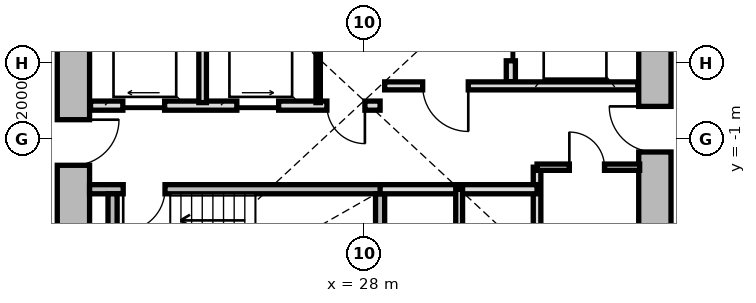
"""IFC4 building model, lengths in metres.
Left out: names, types, materials, properties, quantities, classifications, styles, units other than length and angle.
Written with IfcOpenShell. Run it as: python <this file> out.ifc"""

import sys

from ifc_helpers import new_model, si_unit, direction, frame, frame_2d, origin, place, context, subcontext, project, spatial, rectangle, extrude, source, transform, mapped, element, fill, save


model = new_model("IFC4")
c1 = context("Model", 3, precision=1e-05, world=origin(), true_north=direction((0.0, 1.0)))
c2 = subcontext(c1, "Body", "Model", "MODEL_VIEW")
j1 = project(units=[si_unit("LENGTHUNIT", "METRE"), si_unit("PLANEANGLEUNIT", "RADIAN")], contexts=[c1])
p1 = place(None, origin())
s1 = spatial("IfcSite", under=j1, at=p1, CompositionType="ELEMENT")
p2 = place(p1, origin())
s2 = spatial("IfcBuilding", under=s1, at=p2, CompositionType="ELEMENT")
p3 = place(p2, frame((0.0, 0.0, 21.6)))
s3 = spatial("IfcBuildingStorey", under=s2, at=p3, CompositionType="ELEMENT", Elevation=21.6)
m1 = source(origin(), c2, "Body", "SweptSolid", [
    extrude(rectangle(XDim=11.0, YDim=0.85, at=frame_2d((5.5, 0.0))), origin(), (0.0, 0.0, 1.0), 2.79),
])
p4 = place(p3, frame((20.35, -5.5, 0.0), z_axis=(0.0, 0.0, 1.0), x_axis=(0.0, 1.0, 0.0)))
e1 = element("IfcWall", 1, at=p4, inside=s3, PredefinedType="SHEAR", context=c2, shape_type="MappedRepresentation", body=[
    mapped(m1, transform((0.0, 0.0, 0.0), x_axis=(1.0, 0.0, 0.0), y_axis=(0.0, 1.0, 0.0), z_axis=(0.0, 0.0, 1.0), scale=1.0)),
])
p5 = place(p4, frame((3.8, 0.0, 0.0)))
e2 = element("IfcOpeningElement", 2, at=p5, cuts=e1, PredefinedType="OPENING", context=c2, shape_type="SweptSolid", body=[
    extrude(rectangle(XDim=1.2, YDim=2.15, at=frame_2d((0.6, 1.075))), frame((0.0, 0.435, 0.0), z_axis=(0.0, -1.0, 0.0), x_axis=(1.0, 0.0, 0.0)), (0.0, 0.0, 1.0), 0.87),
])
p6 = place(p3, frame((35.65, 5.5, 0.0), z_axis=(0.0, 0.0, 1.0), x_axis=(0.0, -1.0, 0.0)))
e3 = element("IfcWall", 3, at=p6, inside=s3, PredefinedType="SHEAR", context=c2, shape_type="MappedRepresentation", body=[
    mapped(m1, transform((0.0, 0.0, 0.0), x_axis=(1.0, 0.0, 0.0), y_axis=(0.0, 1.0, 0.0), z_axis=(0.0, 0.0, 1.0), scale=1.0)),
])
p7 = place(p6, frame((5.65, 0.0, 0.0)))
e4 = element("IfcOpeningElement", 4, at=p7, cuts=e3, PredefinedType="OPENING", context=c2, shape_type="SweptSolid", body=[
    extrude(rectangle(XDim=1.2, YDim=2.15, at=frame_2d((0.6, 1.075))), frame((0.0, 0.435, 0.0), z_axis=(0.0, -1.0, 0.0), x_axis=(1.0, 0.0, 0.0)), (0.0, 0.0, 1.0), 0.87),
])
p8 = place(p6, frame((9.3, 0.0, 0.0)))
e5 = element("IfcOpeningElement", 5, at=p8, cuts=e3, PredefinedType="OPENING", context=c2, shape_type="SweptSolid", body=[
    extrude(rectangle(XDim=1.0, YDim=2.1, at=frame_2d((0.5, 1.05))), frame((0.0, 0.435, 0.0), z_axis=(0.0, -1.0, 0.0), x_axis=(1.0, 0.0, 0.0)), (0.0, 0.0, 1.0), 0.87),
])
m2 = source(origin(), c2, "Body", "SweptSolid", [
    extrude(rectangle(XDim=7.765, YDim=0.24, at=frame_2d((3.883, 0.0))), origin(), (0.0, 0.0, 1.0), 2.79),
])
p9 = place(p3, frame((20.775, -2.33, 0.0), z_axis=(0.0, 0.0, 1.0), x_axis=(1.0, 0.0, 0.0)))
e6 = element("IfcWall", 6, at=p9, inside=s3, PredefinedType="PARTITIONING", context=c2, shape_type="MappedRepresentation", body=[
    mapped(m2, transform((0.0, 0.0, 0.0), x_axis=(1.0, 0.0, 0.0), y_axis=(0.0, 1.0, 0.0), z_axis=(0.0, 0.0, 1.0), scale=1.0)),
])
p10 = place(p9, frame((0.885, 0.0, 0.0)))
e7 = element("IfcOpeningElement", 7, at=p10, cuts=e6, PredefinedType="OPENING", context=c2, shape_type="SweptSolid", body=[
    extrude(rectangle(XDim=1.1, YDim=2.15, at=frame_2d((0.55, 1.075))), frame((0.0, 0.13, 0.0), z_axis=(0.0, -1.0, 0.0), x_axis=(1.0, 0.0, 0.0)), (0.0, 0.0, 1.0), 0.26),
])
m3 = source(origin(), c2, "Body", "SweptSolid", [
    extrude(rectangle(XDim=3.075, YDim=0.24, at=frame_2d((1.538, 0.0))), origin(), (0.0, 0.0, 1.0), 2.79),
])
for number, where, z_axis, x_axis in (
    (8, (21.38, -5.525, 0.0), (0.0, 0.0, 1.0), (0.0, 1.0, 0.0)),
    (9, (28.42, -5.525, 0.0), (0.0, 0.0, 1.0), (0.0, 1.0, 0.0)),
):
    element("IfcWall", number, at=place(p3, frame(where, z_axis=z_axis, x_axis=x_axis)), inside=s3, PredefinedType="PARTITIONING", context=c2, shape_type="MappedRepresentation", body=[
        mapped(m3, transform((0.0, 0.0, 0.0), x_axis=(1.0, 0.0, 0.0), y_axis=(0.0, 1.0, 0.0), z_axis=(0.0, 0.0, 1.0), scale=1.0)),
    ])
m4 = source(origin(), c2, "Body", "SweptSolid", [
    extrude(rectangle(XDim=5.0, YDim=0.24, at=frame_2d((2.5, 0.0))), origin(), (0.0, 0.0, 1.0), 2.775),
])
p11 = place(p3, frame((31.86, 0.5, 0.0), z_axis=(0.0, 0.0, 1.0), x_axis=(0.0, 1.0, 0.0)))
e10 = element("IfcWall", 10, at=p11, inside=s3, PredefinedType="PARTITIONING", context=c2, shape_type="MappedRepresentation", body=[
    mapped(m4, transform((0.0, 0.0, 0.0), x_axis=(1.0, 0.0, 0.0), y_axis=(0.0, 1.0, 0.0), z_axis=(0.0, 0.0, 1.0), scale=1.0)),
])
p12 = place(p11, frame((3.05, 0.0, 0.0)))
e11 = element("IfcOpeningElement", 11, at=p12, cuts=e10, PredefinedType="OPENING", context=c2, shape_type="SweptSolid", body=[
    extrude(rectangle(XDim=1.3, YDim=2.2, at=frame_2d((0.65, 1.1))), frame((0.0, 0.13, 0.0), z_axis=(0.0, -1.0, 0.0), x_axis=(1.0, 0.0, 0.0)), (0.0, 0.0, 1.0), 0.26),
])
p13 = place(p11, frame((0.55, 0.0, 0.0)))
e12 = element("IfcOpeningElement", 12, at=p13, cuts=e10, PredefinedType="OPENING", context=c2, shape_type="SweptSolid", body=[
    extrude(rectangle(XDim=1.3, YDim=2.2, at=frame_2d((0.65, 1.1))), frame((0.0, 0.13, 0.0), z_axis=(0.0, -1.0, 0.0), x_axis=(1.0, 0.0, 0.0)), (0.0, 0.0, 1.0), 0.26),
])
m5 = source(origin(), c2, "Body", "SweptSolid", [
    extrude(rectangle(XDim=6.66, YDim=0.21, at=frame_2d((3.33, 0.0))), origin(), (0.0, 0.0, 1.0), 2.775),
])
p14 = place(p3, frame((28.54, 0.39, 0.0), z_axis=(0.0, 0.0, 1.0), x_axis=(1.0, 0.0, 0.0)))
e13 = element("IfcWall", 13, at=p14, inside=s3, PredefinedType="PARTITIONING", context=c2, shape_type="MappedRepresentation", body=[
    mapped(m5, transform((0.0, 0.0, 0.0), x_axis=(1.0, 0.0, 0.0), y_axis=(0.0, 1.0, 0.0), z_axis=(0.0, 0.0, 1.0), scale=1.0)),
])
p15 = place(p14, frame((1.0, 0.0, 0.0)))
e14 = element("IfcOpeningElement", 14, at=p15, cuts=e13, PredefinedType="OPENING", context=c2, shape_type="SweptSolid", body=[
    extrude(rectangle(XDim=1.2, YDim=2.15, at=frame_2d((0.6, 1.075))), frame((0.0, 0.115, 0.0), z_axis=(0.0, -1.0, 0.0), x_axis=(1.0, 0.0, 0.0)), (0.0, 0.0, 1.0), 0.23),
])
m6 = source(origin(), c2, "Body", "SweptSolid", [
    extrude(rectangle(XDim=7.62, YDim=0.24, at=frame_2d((3.81, 0.0))), origin(), (0.0, 0.0, 1.0), 2.775),
])
p16 = place(p3, frame((20.8, -0.13, 0.0), z_axis=(0.0, 0.0, 1.0), x_axis=(1.0, 0.0, 0.0)))
e15 = element("IfcWall", 15, at=p16, inside=s3, PredefinedType="PARTITIONING", context=c2, shape_type="MappedRepresentation", body=[
    mapped(m6, transform((0.0, 0.0, 0.0), x_axis=(1.0, 0.0, 0.0), y_axis=(0.0, 1.0, 0.0), z_axis=(0.0, 0.0, 1.0), scale=1.0)),
])
p17 = place(p16, frame((6.22, 0.0, 0.0)))
e16 = element("IfcOpeningElement", 16, at=p17, cuts=e15, PredefinedType="OPENING", context=c2, shape_type="SweptSolid", body=[
    extrude(rectangle(XDim=1.0, YDim=2.1, at=frame_2d((0.5, 1.05))), frame((0.0, 0.13, 0.0), z_axis=(0.0, -1.0, 0.0), x_axis=(1.0, 0.0, 0.0)), (0.0, 0.0, 1.0), 0.26),
])
p18 = place(p16, frame((0.85, 0.0, 0.0)))
e17 = element("IfcOpeningElement", 17, at=p18, cuts=e15, PredefinedType="OPENING", context=c2, shape_type="SweptSolid", body=[
    extrude(rectangle(XDim=1.1, YDim=2.2, at=frame_2d((0.55, 1.1))), frame((0.0, 0.13, 0.0), z_axis=(0.0, -1.0, 0.0), x_axis=(1.0, 0.0, 0.0)), (0.0, 0.0, 1.0), 0.26),
])
p19 = place(p16, frame((3.85, 0.0, 0.0)))
e18 = element("IfcOpeningElement", 18, at=p19, cuts=e15, PredefinedType="OPENING", context=c2, shape_type="SweptSolid", body=[
    extrude(rectangle(XDim=1.1, YDim=2.2, at=frame_2d((0.55, 1.1))), frame((0.0, 0.13, 0.0), z_axis=(0.0, -1.0, 0.0), x_axis=(1.0, 0.0, 0.0)), (0.0, 0.0, 1.0), 0.26),
])
m7 = source(origin(), c2, "Body", "SweptSolid", [
    extrude(rectangle(XDim=2.33, YDim=0.115, at=frame_2d((1.165, 0.0))), origin(), (0.0, 0.0, 1.0), 2.775),
])
p20 = place(p3, frame((26.79, -0.05, 0.0), z_axis=(0.0, 0.0, 1.0), x_axis=(0.0, 1.0, 0.0)))
e19 = element("IfcWall", 19, at=p20, inside=s3, PredefinedType="PARTITIONING", context=c2, shape_type="MappedRepresentation", body=[
    mapped(m7, transform((0.0, 0.0, 0.0), x_axis=(1.0, 0.0, 0.0), y_axis=(0.0, 1.0, 0.0), z_axis=(0.0, 0.0, 1.0), scale=1.0)),
])
m8 = source(origin(), c2, "Body", "SweptSolid", [
    extrude(rectangle(XDim=2.33, YDim=0.2, at=frame_2d((1.165, 0.0))), origin(), (0.0, 0.0, 1.0), 2.775),
])
p21 = place(p3, frame((23.75, -0.05, 0.0), z_axis=(0.0, 0.0, 1.0), x_axis=(0.0, 1.0, 0.0)))
e20 = element("IfcWall", 20, at=p21, inside=s3, PredefinedType="PARTITIONING", context=c2, shape_type="MappedRepresentation", body=[
    mapped(m8, transform((0.0, 0.0, 0.0), x_axis=(1.0, 0.0, 0.0), y_axis=(0.0, 1.0, 0.0), z_axis=(0.0, 0.0, 1.0), scale=1.0)),
])
m9 = source(origin(), c2, "Body", "SweptSolid", [
    extrude(rectangle(XDim=3.8, YDim=0.2, at=frame_2d((1.9, 0.0))), origin(), (0.0, 0.0, 1.0), 2.775),
])
p22 = place(p3, frame((32.55, -5.55, 0.0), z_axis=(0.0, 0.0, 1.0), x_axis=(0.0, 1.0, 0.0)))
e21 = element("IfcWall", 21, at=p22, inside=s3, PredefinedType="PARTITIONING", context=c2, shape_type="MappedRepresentation", body=[
    mapped(m9, transform((0.0, 0.0, 0.0), x_axis=(1.0, 0.0, 0.0), y_axis=(0.0, 1.0, 0.0), z_axis=(0.0, 0.0, 1.0), scale=1.0)),
])
m10 = source(origin(), c2, "Body", "SweptSolid", [
    extrude(rectangle(XDim=4.13, YDim=0.24, at=frame_2d((2.065, 0.0))), origin(), (0.0, 0.0, 1.0), 2.775),
])
p23 = place(p3, frame((28.42, -2.33, 0.0), z_axis=(0.0, 0.0, 1.0), x_axis=(1.0, 0.0, 0.0)))
e22 = element("IfcWall", 22, at=p23, inside=s3, PredefinedType="PARTITIONING", context=c2, shape_type="MappedRepresentation", body=[
    mapped(m10, transform((0.0, 0.0, 0.0), x_axis=(1.0, 0.0, 0.0), y_axis=(0.0, 1.0, 0.0), z_axis=(0.0, 0.0, 1.0), scale=1.0)),
])
m11 = source(origin(), c2, "Body", "SweptSolid", [
    extrude(rectangle(XDim=3.22, YDim=0.18, at=frame_2d((1.61, 0.0))), origin(), (0.0, 0.0, 1.0), 2.775),
])
p24 = place(p3, frame((30.5, -5.55, 0.0), z_axis=(0.0, 0.0, 1.0), x_axis=(0.0, 1.0, 0.0)))
e23 = element("IfcWall", 23, at=p24, inside=s3, PredefinedType="PARTITIONING", context=c2, shape_type="MappedRepresentation", body=[
    mapped(m11, transform((0.0, 0.0, 0.0), x_axis=(1.0, 0.0, 0.0), y_axis=(0.0, 1.0, 0.0), z_axis=(0.0, 0.0, 1.0), scale=1.0)),
])
m12 = source(origin(), c2, "Body", "SweptSolid", [
    extrude(rectangle(XDim=2.7, YDim=0.165, at=frame_2d((1.35, 0.0))), origin(), (0.0, 0.0, 1.0), 2.775),
])
p25 = place(p3, frame((32.55, -1.75, 0.0), z_axis=(0.0, 0.0, 1.0), x_axis=(1.0, 0.0, 0.0)))
e24 = element("IfcWall", 24, at=p25, inside=s3, PredefinedType="PARTITIONING", context=c2, shape_type="MappedRepresentation", body=[
    mapped(m12, transform((0.0, 0.0, 0.0), x_axis=(1.0, 0.0, 0.0), y_axis=(0.0, 1.0, 0.0), z_axis=(0.0, 0.0, 1.0), scale=1.0)),
])
p26 = place(p25, frame((0.85, 0.0, 0.0)))
e25 = element("IfcOpeningElement", 25, at=p26, cuts=e24, PredefinedType="OPENING", context=c2, shape_type="SweptSolid", body=[
    extrude(rectangle(XDim=0.925, YDim=2.1, at=frame_2d((0.462, 1.05))), frame((0.0, 0.093, 0.0), z_axis=(0.0, -1.0, 0.0), x_axis=(1.0, 0.0, 0.0)), (0.0, 0.0, 1.0), 0.185),
])
m13 = source(origin(), c2, "Body", "SweptSolid", [
    extrude(rectangle(XDim=1.1, YDim=2.15, at=frame_2d((0.55, 1.075))), frame((0.0, 0.025, 0.0), z_axis=(0.0, -1.0, 0.0), x_axis=(1.0, 0.0, 0.0)), (0.0, 0.0, 1.0), 0.05),
])
p27 = place(p10, frame((1.1, 0.0, 0.0), z_axis=(0.0, 0.0, 1.0), x_axis=(-1.0, 0.0, 0.0)))
e26 = element("IfcDoor", 26, at=p27, inside=s3, OperationType="SINGLE_SWING_RIGHT", PredefinedType="DOOR", context=c2, shape_type="MappedRepresentation", body=[
    mapped(m13, transform((0.0, 0.0, 0.0), x_axis=(1.0, 0.0, 0.0), y_axis=(0.0, 1.0, 0.0), z_axis=(0.0, 0.0, 1.0), scale=1.0)),
])
fill(e7, e26)
m14 = source(origin(), c2, "Body", "SweptSolid", [
    extrude(rectangle(XDim=1.3, YDim=2.2, at=frame_2d((0.65, 1.1))), frame((0.0, 0.025, 0.0), z_axis=(0.0, -1.0, 0.0), x_axis=(1.0, 0.0, 0.0)), (0.0, 0.0, 1.0), 0.05),
])
p28 = place(p13, origin())
e27 = element("IfcDoor", 27, at=p28, inside=s3, OperationType="SLIDING_TO_RIGHT", PredefinedType="DOOR", context=c2, shape_type="MappedRepresentation", body=[
    mapped(m14, transform((0.0, 0.0, 0.0), x_axis=(1.0, 0.0, 0.0), y_axis=(0.0, 1.0, 0.0), z_axis=(0.0, 0.0, 1.0), scale=1.0)),
])
fill(e12, e27)
m15 = source(origin(), c2, "Body", "SweptSolid", [
    extrude(rectangle(XDim=1.2, YDim=2.15, at=frame_2d((0.6, 1.075))), frame((0.0, 0.025, 0.0), z_axis=(0.0, -1.0, 0.0), x_axis=(1.0, 0.0, 0.0)), (0.0, 0.0, 1.0), 0.05),
])
p29 = place(p15, frame((1.2, 0.0, 0.0), z_axis=(0.0, 0.0, 1.0), x_axis=(-1.0, 0.0, 0.0)))
e28 = element("IfcDoor", 28, at=p29, inside=s3, OperationType="SINGLE_SWING_LEFT", PredefinedType="DOOR", context=c2, shape_type="MappedRepresentation", body=[
    mapped(m15, transform((0.0, 0.0, 0.0), x_axis=(1.0, 0.0, 0.0), y_axis=(0.0, 1.0, 0.0), z_axis=(0.0, 0.0, 1.0), scale=1.0)),
])
fill(e14, e28)
p30 = place(p5, frame((1.2, 0.0, 0.0), z_axis=(0.0, 0.0, 1.0), x_axis=(-1.0, 0.0, 0.0)))
e29 = element("IfcDoor", 29, at=p30, inside=s3, OperationType="SINGLE_SWING_LEFT", PredefinedType="DOOR", context=c2, shape_type="MappedRepresentation", body=[
    mapped(m15, transform((0.0, 0.0, 0.0), x_axis=(1.0, 0.0, 0.0), y_axis=(0.0, 1.0, 0.0), z_axis=(0.0, 0.0, 1.0), scale=1.0)),
])
fill(e2, e29)
p31 = place(p7, frame((1.2, 0.0, 0.0), z_axis=(0.0, 0.0, 1.0), x_axis=(-1.0, 0.0, 0.0)))
e30 = element("IfcDoor", 30, at=p31, inside=s3, OperationType="SINGLE_SWING_RIGHT", PredefinedType="DOOR", context=c2, shape_type="MappedRepresentation", body=[
    mapped(m15, transform((0.0, 0.0, 0.0), x_axis=(1.0, 0.0, 0.0), y_axis=(0.0, 1.0, 0.0), z_axis=(0.0, 0.0, 1.0), scale=1.0)),
])
fill(e4, e30)
m16 = source(origin(), c2, "Body", "SweptSolid", [
    extrude(rectangle(XDim=1.0, YDim=2.1, at=frame_2d((0.5, 1.05))), frame((0.0, 0.025, 0.0), z_axis=(0.0, -1.0, 0.0), x_axis=(1.0, 0.0, 0.0)), (0.0, 0.0, 1.0), 0.05),
])
p32 = place(p17, frame((1.0, 0.0, 0.0), z_axis=(0.0, 0.0, 1.0), x_axis=(-1.0, 0.0, 0.0)))
e31 = element("IfcDoor", 31, at=p32, inside=s3, OperationType="SINGLE_SWING_LEFT", PredefinedType="DOOR", context=c2, shape_type="MappedRepresentation", body=[
    mapped(m16, transform((0.0, 0.0, 0.0), x_axis=(1.0, 0.0, 0.0), y_axis=(0.0, 1.0, 0.0), z_axis=(0.0, 0.0, 1.0), scale=1.0)),
])
fill(e16, e31)
m17 = source(origin(), c2, "Body", "SweptSolid", [
    extrude(rectangle(XDim=1.1, YDim=2.2, at=frame_2d((0.55, 1.1))), frame((0.0, 0.025, 0.0), z_axis=(0.0, -1.0, 0.0), x_axis=(1.0, 0.0, 0.0)), (0.0, 0.0, 1.0), 0.05),
])
p33 = place(p18, origin())
e32 = element("IfcDoor", 32, at=p33, inside=s3, OperationType="SLIDING_TO_LEFT", PredefinedType="DOOR", context=c2, shape_type="MappedRepresentation", body=[
    mapped(m17, transform((0.0, 0.0, 0.0), x_axis=(1.0, 0.0, 0.0), y_axis=(0.0, 1.0, 0.0), z_axis=(0.0, 0.0, 1.0), scale=1.0)),
])
fill(e17, e32)
p34 = place(p19, origin())
e33 = element("IfcDoor", 33, at=p34, inside=s3, OperationType="SLIDING_TO_RIGHT", PredefinedType="DOOR", context=c2, shape_type="MappedRepresentation", body=[
    mapped(m17, transform((0.0, 0.0, 0.0), x_axis=(1.0, 0.0, 0.0), y_axis=(0.0, 1.0, 0.0), z_axis=(0.0, 0.0, 1.0), scale=1.0)),
])
fill(e18, e33)
m18 = source(origin(), c2, "Body", "SweptSolid", [
    extrude(rectangle(XDim=0.925, YDim=2.1, at=frame_2d((0.462, 1.05))), frame((0.0, 0.025, 0.0), z_axis=(0.0, -1.0, 0.0), x_axis=(1.0, 0.0, 0.0)), (0.0, 0.0, 1.0), 0.05),
])
p35 = place(p26, origin())
e34 = element("IfcDoor", 34, at=p35, inside=s3, OperationType="SINGLE_SWING_LEFT", PredefinedType="DOOR", context=c2, shape_type="MappedRepresentation", body=[
    mapped(m18, transform((0.0, 0.0, 0.0), x_axis=(1.0, 0.0, 0.0), y_axis=(0.0, 1.0, 0.0), z_axis=(0.0, 0.0, 1.0), scale=1.0)),
])
fill(e25, e34)
save(model, sys.argv[1])
